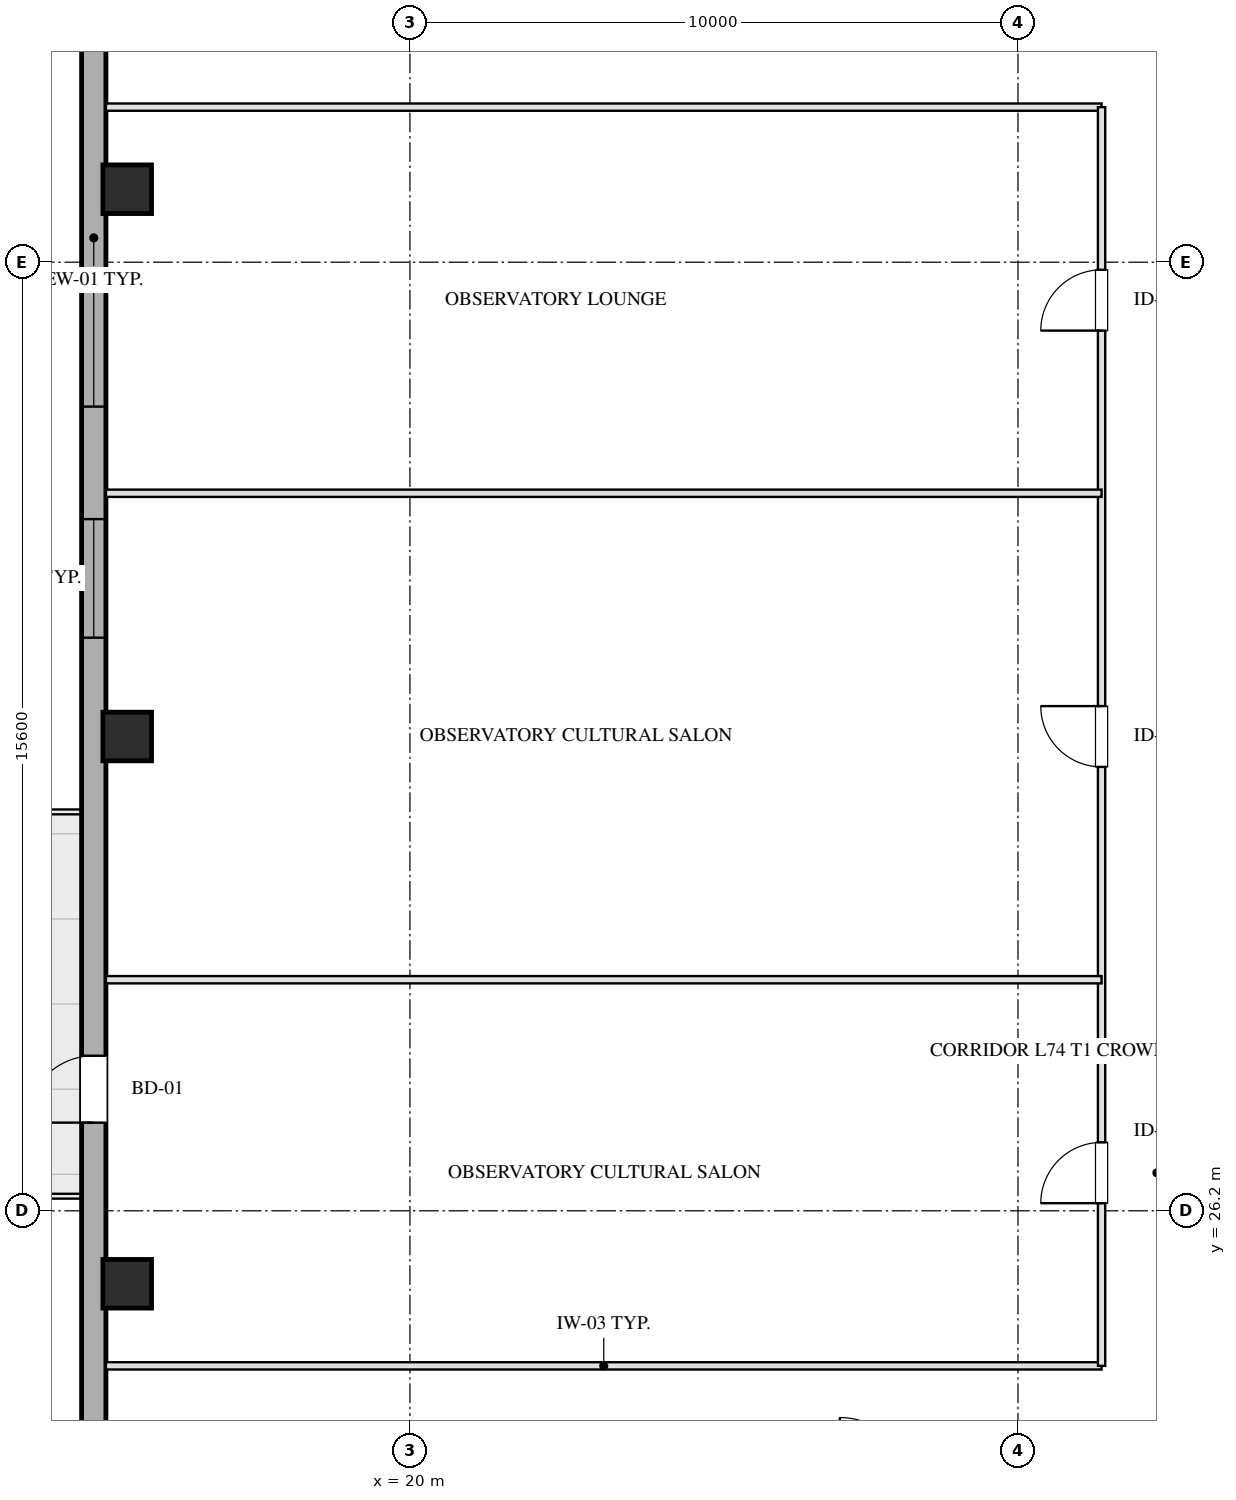
"""IFC4 building model, lengths in metres.
Left out: names, types, materials, properties, quantities, classifications, styles, units other than length and angle.
Written with IfcOpenShell. Run it as: python <this file> out.ifc"""

import sys

from ifc_helpers import new_model, si_unit, direction, frame, frame_2d, origin, origin_2d, place, context, subcontext, project, spatial, rectangle, hollow_rectangle, extrude, element, fill, save


model = new_model("IFC4")
c1 = context("Model", 3, precision=1e-05, world=origin(), true_north=direction((0.0, 1.0)))
c2 = subcontext(c1, "Body", "Model", "MODEL_VIEW")
j1 = project(units=[si_unit("LENGTHUNIT", "METRE"), si_unit("PLANEANGLEUNIT", "RADIAN")], contexts=[c1])
p1 = place(None, origin())
s1 = spatial("IfcSite", under=j1, at=p1, CompositionType="ELEMENT")
p2 = place(p1, origin())
s2 = spatial("IfcBuilding", under=s1, at=p2, CompositionType="ELEMENT")
p3 = place(p2, frame((0.0, 0.0, 269.6)))
s3 = spatial("IfcBuildingStorey", under=s2, at=p3, CompositionType="ELEMENT", Elevation=269.6)
for number, where, z_axis, x_axis in (
    (1, (15.35, 25.0, 0.0), (0.0, 0.0, 1.0), (1.0, 0.0, 0.0)),
    (2, (15.35, 34.0, 0.0), (0.0, 0.0, 1.0), (1.0, 0.0, 0.0)),
    (3, (15.35, 43.0, 0.0), (0.0, 0.0, 1.0), (1.0, 0.0, 0.0)),
):
    element("IfcColumn", number, at=place(p3, frame(where, z_axis=z_axis, x_axis=x_axis)), inside=s3, PredefinedType="COLUMN", context=c2, shape_type="SweptSolid", body=[
        extrude(hollow_rectangle(XDim=0.8, YDim=0.8, WallThickness=0.028, at=origin_2d()), origin(), (0.0, 0.0, 1.0), 3.201),
    ])
p4 = place(p3, frame((14.8, 13.1, 0.0), z_axis=(0.0, 0.0, 1.0), x_axis=(0.0, 1.0, 0.0)))
e4 = element("IfcWall", 4, at=p4, inside=s3, PredefinedType="SOLIDWALL", context=c2, shape_type="SweptSolid", body=[
    extrude(rectangle(XDim=41.8, YDim=0.4, at=frame_2d((20.9, 0.0))), origin(), (0.0, 0.0, 1.0), 2.36),
])
p5 = place(p4, frame((22.525, 0.0, 0.75)))
e5 = element("IfcOpeningElement", 5, at=p5, cuts=e4, PredefinedType="OPENING", context=c2, shape_type="SweptSolid", body=[
    extrude(rectangle(XDim=1.95, YDim=1.21, at=frame_2d((0.975, 0.605))), frame((0.0, 0.21, 0.0), z_axis=(0.0, -1.0, 0.0), x_axis=(1.0, 0.0, 0.0)), (0.0, 0.0, 1.0), 0.42),
])
p6 = place(p4, frame((26.325, 0.0, 0.75)))
e6 = element("IfcOpeningElement", 6, at=p6, cuts=e4, PredefinedType="OPENING", context=c2, shape_type="SweptSolid", body=[
    extrude(rectangle(XDim=1.95, YDim=1.21, at=frame_2d((0.975, 0.605))), frame((0.0, 0.21, 0.0), z_axis=(0.0, -1.0, 0.0), x_axis=(1.0, 0.0, 0.0)), (0.0, 0.0, 1.0), 0.42),
])
p7 = place(p4, frame((14.55, 0.0, 0.0)))
e7 = element("IfcOpeningElement", 7, at=p7, cuts=e4, PredefinedType="OPENING", context=c2, shape_type="SweptSolid", body=[
    extrude(rectangle(XDim=1.1, YDim=2.15, at=frame_2d((0.55, 1.075))), frame((0.0, 0.21, 0.0), z_axis=(0.0, -1.0, 0.0), x_axis=(1.0, 0.0, 0.0)), (0.0, 0.0, 1.0), 0.42),
])
for number, where, z_axis, x_axis in (
    (8, (15.0, 23.65, 0.0), (0.0, 0.0, 1.0), (1.0, 0.0, 0.0)),
    (9, (15.0, 44.35, 0.0), (0.0, 0.0, 1.0), (1.0, 0.0, 0.0)),
):
    element("IfcWall", number, at=place(p3, frame(where, z_axis=z_axis, x_axis=x_axis)), inside=s3, PredefinedType="PARTITIONING", context=c2, shape_type="SweptSolid", body=[
        extrude(rectangle(XDim=16.375, YDim=0.12, at=frame_2d((8.188, 0.0))), origin(), (0.0, 0.0, 1.0), 2.925),
    ])
p8 = place(p3, frame((31.375, 23.65, 0.0), z_axis=(0.0, 0.0, 1.0), x_axis=(0.0, 1.0, 0.0)))
e10 = element("IfcWall", 10, at=p8, inside=s3, PredefinedType="PARTITIONING", context=c2, shape_type="SweptSolid", body=[
    extrude(rectangle(XDim=20.7, YDim=0.12, at=frame_2d((10.35, 0.0))), origin(), (0.0, 0.0, 1.0), 2.925),
])
p9 = place(p8, frame((2.675, 0.0, 0.0)))
e11 = element("IfcOpeningElement", 11, at=p9, cuts=e10, PredefinedType="OPENING", context=c2, shape_type="SweptSolid", body=[
    extrude(rectangle(XDim=1.0, YDim=2.05, at=frame_2d((0.5, 1.025))), frame((0.0, 0.07, 0.0), z_axis=(0.0, -1.0, 0.0), x_axis=(1.0, 0.0, 0.0)), (0.0, 0.0, 1.0), 0.14),
])
p10 = place(p8, frame((9.85, 0.0, 0.0)))
e12 = element("IfcOpeningElement", 12, at=p10, cuts=e10, PredefinedType="OPENING", context=c2, shape_type="SweptSolid", body=[
    extrude(rectangle(XDim=1.0, YDim=2.05, at=frame_2d((0.5, 1.025))), frame((0.0, 0.07, 0.0), z_axis=(0.0, -1.0, 0.0), x_axis=(1.0, 0.0, 0.0)), (0.0, 0.0, 1.0), 0.14),
])
p11 = place(p8, frame((17.025, 0.0, 0.0)))
e13 = element("IfcOpeningElement", 13, at=p11, cuts=e10, PredefinedType="OPENING", context=c2, shape_type="SweptSolid", body=[
    extrude(rectangle(XDim=1.0, YDim=2.05, at=frame_2d((0.5, 1.025))), frame((0.0, 0.07, 0.0), z_axis=(0.0, -1.0, 0.0), x_axis=(1.0, 0.0, 0.0)), (0.0, 0.0, 1.0), 0.14),
])
for number, where, z_axis, x_axis in (
    (14, (15.0, 30.0, 0.0), (0.0, 0.0, 1.0), (1.0, 0.0, 0.0)),
    (15, (15.0, 38.0, 0.0), (0.0, 0.0, 1.0), (1.0, 0.0, 0.0)),
):
    element("IfcWall", number, at=place(p3, frame(where, z_axis=z_axis, x_axis=x_axis)), inside=s3, PredefinedType="PARTITIONING", context=c2, shape_type="SweptSolid", body=[
        extrude(rectangle(XDim=16.375, YDim=0.12, at=frame_2d((8.188, 0.0))), origin(), (0.0, 0.0, 1.0), 2.925),
    ])
p12 = place(p5, origin())
e16 = element("IfcWindow", 16, at=p12, inside=s3, PartitioningType="TRIPLE_PANEL_VERTICAL", PredefinedType="WINDOW", context=c2, shape_type="SweptSolid", body=[
    extrude(rectangle(XDim=1.95, YDim=1.21, at=frame_2d((0.975, 0.605))), frame((0.0, 0.03, 0.0), z_axis=(0.0, -1.0, 0.0), x_axis=(1.0, 0.0, 0.0)), (0.0, 0.0, 1.0), 0.06),
])
fill(e5, e16)
p13 = place(p6, origin())
e17 = element("IfcWindow", 17, at=p13, inside=s3, PartitioningType="TRIPLE_PANEL_VERTICAL", PredefinedType="WINDOW", context=c2, shape_type="SweptSolid", body=[
    extrude(rectangle(XDim=1.95, YDim=1.21, at=frame_2d((0.975, 0.605))), frame((0.0, 0.03, 0.0), z_axis=(0.0, -1.0, 0.0), x_axis=(1.0, 0.0, 0.0)), (0.0, 0.0, 1.0), 0.06),
])
fill(e6, e17)
p14 = place(p7, origin())
e18 = element("IfcDoor", 18, at=p14, inside=s3, OperationType="SINGLE_SWING_LEFT", PredefinedType="DOOR", context=c2, shape_type="SweptSolid", body=[
    extrude(rectangle(XDim=1.1, YDim=2.15, at=frame_2d((0.55, 1.075))), frame((0.0, 0.025, 0.0), z_axis=(0.0, -1.0, 0.0), x_axis=(1.0, 0.0, 0.0)), (0.0, 0.0, 1.0), 0.05),
])
fill(e7, e18)
p15 = place(p9, origin())
e19 = element("IfcDoor", 19, at=p15, inside=s3, OperationType="SINGLE_SWING_LEFT", PredefinedType="DOOR", context=c2, shape_type="SweptSolid", body=[
    extrude(rectangle(XDim=1.0, YDim=2.05, at=frame_2d((0.5, 1.025))), frame((0.0, 0.025, 0.0), z_axis=(0.0, -1.0, 0.0), x_axis=(1.0, 0.0, 0.0)), (0.0, 0.0, 1.0), 0.05),
])
fill(e11, e19)
p16 = place(p10, origin())
e20 = element("IfcDoor", 20, at=p16, inside=s3, OperationType="SINGLE_SWING_RIGHT", PredefinedType="DOOR", context=c2, shape_type="SweptSolid", body=[
    extrude(rectangle(XDim=1.0, YDim=2.05, at=frame_2d((0.5, 1.025))), frame((0.0, 0.025, 0.0), z_axis=(0.0, -1.0, 0.0), x_axis=(1.0, 0.0, 0.0)), (0.0, 0.0, 1.0), 0.05),
])
fill(e12, e20)
p17 = place(p11, origin())
e21 = element("IfcDoor", 21, at=p17, inside=s3, OperationType="SINGLE_SWING_LEFT", PredefinedType="DOOR", context=c2, shape_type="SweptSolid", body=[
    extrude(rectangle(XDim=1.0, YDim=2.05, at=frame_2d((0.5, 1.025))), frame((0.0, 0.025, 0.0), z_axis=(0.0, -1.0, 0.0), x_axis=(1.0, 0.0, 0.0)), (0.0, 0.0, 1.0), 0.05),
])
fill(e13, e21)
save(model, sys.argv[1])
